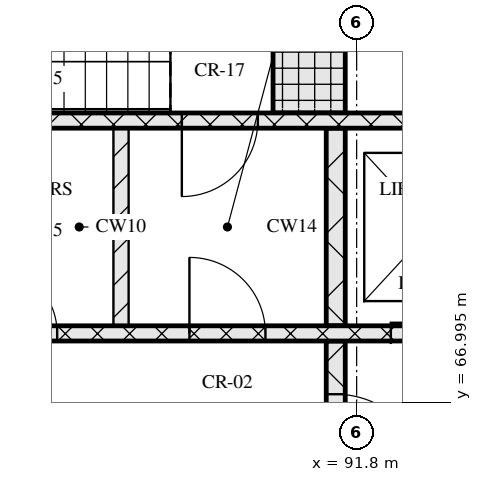
"""IFC4 building model, lengths in metres.
Left out: names, types, materials, properties, quantities, classifications, styles, units other than length and angle.
Written with IfcOpenShell. Run it as: python <this file> out.ifc"""

import sys

from ifc_helpers import new_model, si_unit, direction, frame, frame_2d, origin, place, context, subcontext, project, spatial, rectangle, extrude, element, fill, save


model = new_model("IFC4")
c1 = context("Model", 3, precision=1e-05, world=origin(), true_north=direction((0.0, 1.0)))
c2 = subcontext(c1, "Body", "Model", "MODEL_VIEW")
j1 = project(units=[si_unit("LENGTHUNIT", "METRE"), si_unit("PLANEANGLEUNIT", "RADIAN")], contexts=[c1])
p1 = place(None, origin())
s1 = spatial("IfcSite", under=j1, at=p1, CompositionType="ELEMENT")
p2 = place(p1, origin())
s2 = spatial("IfcBuilding", under=s1, at=p2, CompositionType="ELEMENT")
p3 = place(p2, frame((0.0, 0.0, 234.3)))
s3 = spatial("IfcBuildingStorey", under=s2, at=p3, CompositionType="ELEMENT", Elevation=234.3)
p4 = place(p3, frame((91.525, 65.2, 0.0), z_axis=(0.0, 0.0, 1.0), x_axis=(0.0, 1.0, 0.0)))
e1 = element("IfcWall", 1, at=p4, inside=s3, PredefinedType="SOLIDWALL", context=c2, shape_type="SweptSolid", body=[
    extrude(rectangle(XDim=2.6, YDim=0.25, at=frame_2d((1.3, 0.0))), origin(), (0.0, 0.0, 1.0), 3.32),
])
p5 = place(p4, frame((0.7, 0.0, 0.0)))
e2 = element("IfcOpeningElement", 2, at=p5, cuts=e1, PredefinedType="OPENING", context=c2, shape_type="SweptSolid", body=[
    extrude(rectangle(XDim=1.2, YDim=2.1, at=frame_2d((0.6, 1.05))), frame((0.0, 0.135, 0.0), z_axis=(0.0, -1.0, 0.0), x_axis=(1.0, 0.0, 0.0)), (0.0, 0.0, 1.0), 0.27),
])
p6 = place(p3, frame((76.05, 67.9, 0.0), z_axis=(0.0, 0.0, 1.0), x_axis=(1.0, 0.0, 0.0)))
e3 = element("IfcWall", 3, at=p6, inside=s3, PredefinedType="SOLIDWALL", context=c2, shape_type="SweptSolid", body=[
    extrude(rectangle(XDim=23.1, YDim=0.2, at=frame_2d((11.55, 0.0))), origin(), (0.0, 0.0, 1.0), 3.32),
])
p7 = place(p6, frame((1.35, 0.0, 0.0)))
e4 = element("IfcOpeningElement", 4, at=p7, cuts=e3, PredefinedType="OPENING", context=c2, shape_type="SweptSolid", body=[
    extrude(rectangle(XDim=0.9, YDim=2.1, at=frame_2d((0.45, 1.05))), frame((0.0, 0.11, 0.0), z_axis=(0.0, -1.0, 0.0), x_axis=(1.0, 0.0, 0.0)), (0.0, 0.0, 1.0), 0.22),
])
p8 = place(p6, frame((5.06, 0.0, 0.0)))
e5 = element("IfcOpeningElement", 5, at=p8, cuts=e3, PredefinedType="OPENING", context=c2, shape_type="SweptSolid", body=[
    extrude(rectangle(XDim=0.9, YDim=2.1, at=frame_2d((0.45, 1.05))), frame((0.0, 0.11, 0.0), z_axis=(0.0, -1.0, 0.0), x_axis=(1.0, 0.0, 0.0)), (0.0, 0.0, 1.0), 0.22),
])
p9 = place(p6, frame((8.45, 0.0, 0.0)))
e6 = element("IfcOpeningElement", 6, at=p9, cuts=e3, PredefinedType="OPENING", context=c2, shape_type="SweptSolid", body=[
    extrude(rectangle(XDim=0.9, YDim=2.1, at=frame_2d((0.45, 1.05))), frame((0.0, 0.11, 0.0), z_axis=(0.0, -1.0, 0.0), x_axis=(1.0, 0.0, 0.0)), (0.0, 0.0, 1.0), 0.22),
])
p10 = place(p6, frame((10.91, 0.0, 0.0)))
e7 = element("IfcOpeningElement", 7, at=p10, cuts=e3, PredefinedType="OPENING", context=c2, shape_type="SweptSolid", body=[
    extrude(rectangle(XDim=0.9, YDim=2.1, at=frame_2d((0.45, 1.05))), frame((0.0, 0.11, 0.0), z_axis=(0.0, -1.0, 0.0), x_axis=(1.0, 0.0, 0.0)), (0.0, 0.0, 1.0), 0.22),
])
p11 = place(p6, frame((13.55, 0.0, 0.0)))
e8 = element("IfcOpeningElement", 8, at=p11, cuts=e3, PredefinedType="OPENING", context=c2, shape_type="SweptSolid", body=[
    extrude(rectangle(XDim=1.0, YDim=2.1, at=frame_2d((0.5, 1.05))), frame((0.0, 0.11, 0.0), z_axis=(0.0, -1.0, 0.0), x_axis=(1.0, 0.0, 0.0)), (0.0, 0.0, 1.0), 0.22),
])
p12 = place(p6, frame((16.2, 0.0, 0.0)))
e9 = element("IfcOpeningElement", 9, at=p12, cuts=e3, PredefinedType="OPENING", context=c2, shape_type="SweptSolid", body=[
    extrude(rectangle(XDim=1.1, YDim=2.1, at=frame_2d((0.55, 1.05))), frame((0.0, 0.11, 0.0), z_axis=(0.0, -1.0, 0.0), x_axis=(1.0, 0.0, 0.0)), (0.0, 0.0, 1.0), 0.22),
])
p13 = place(p6, frame((18.7, 0.0, 0.0)))
e10 = element("IfcOpeningElement", 10, at=p13, cuts=e3, PredefinedType="OPENING", context=c2, shape_type="SweptSolid", body=[
    extrude(rectangle(XDim=1.1, YDim=2.1, at=frame_2d((0.55, 1.05))), frame((0.0, 0.11, 0.0), z_axis=(0.0, -1.0, 0.0), x_axis=(1.0, 0.0, 0.0)), (0.0, 0.0, 1.0), 0.22),
])
p14 = place(p6, frame((21.2, 0.0, 0.0)))
e11 = element("IfcOpeningElement", 11, at=p14, cuts=e3, PredefinedType="OPENING", context=c2, shape_type="SweptSolid", body=[
    extrude(rectangle(XDim=1.1, YDim=2.1, at=frame_2d((0.55, 1.05))), frame((0.0, 0.11, 0.0), z_axis=(0.0, -1.0, 0.0), x_axis=(1.0, 0.0, 0.0)), (0.0, 0.0, 1.0), 0.22),
])
p15 = place(p3, frame((88.7, 68.0, 0.0), z_axis=(0.0, 0.0, 1.0), x_axis=(0.0, 1.0, 0.0)))
e12 = element("IfcWall", 12, at=p15, inside=s3, PredefinedType="PARTITIONING", context=c2, shape_type="SweptSolid", body=[
    extrude(rectangle(XDim=2.6, YDim=0.2, at=frame_2d((1.3, 0.0))), origin(), (0.0, 0.0, 1.0), 3.32),
])
p16 = place(p3, frame((91.525, 68.0, 0.0), z_axis=(0.0, 0.0, 1.0), x_axis=(0.0, 1.0, 0.0)))
e13 = element("IfcWall", 13, at=p16, inside=s3, PredefinedType="SOLIDWALL", context=c2, shape_type="SweptSolid", body=[
    extrude(rectangle(XDim=2.6, YDim=0.25, at=frame_2d((1.3, 0.0))), origin(), (0.0, 0.0, 1.0), 3.32),
])
p17 = place(p3, frame((67.8, 70.7, 0.0), z_axis=(0.0, 0.0, 1.0), x_axis=(1.0, 0.0, 0.0)))
e14 = element("IfcWall", 14, at=p17, inside=s3, PredefinedType="SOLIDWALL", context=c2, shape_type="SweptSolid", body=[
    extrude(rectangle(XDim=39.6, YDim=0.2, at=frame_2d((19.8, 0.0))), origin(), (0.0, 0.0, 1.0), 3.32),
])
p18 = place(p17, frame((0.65, 0.0, 0.0)))
e15 = element("IfcOpeningElement", 15, at=p18, cuts=e14, PredefinedType="OPENING", context=c2, shape_type="SweptSolid", body=[
    extrude(rectangle(XDim=1.1, YDim=2.1, at=frame_2d((0.55, 1.05))), frame((0.0, 0.11, 0.0), z_axis=(0.0, -1.0, 0.0), x_axis=(1.0, 0.0, 0.0)), (0.0, 0.0, 1.0), 0.22),
])
p19 = place(p17, frame((3.25, 0.0, 0.0)))
e16 = element("IfcOpeningElement", 16, at=p19, cuts=e14, PredefinedType="OPENING", context=c2, shape_type="SweptSolid", body=[
    extrude(rectangle(XDim=1.1, YDim=2.1, at=frame_2d((0.55, 1.05))), frame((0.0, 0.11, 0.0), z_axis=(0.0, -1.0, 0.0), x_axis=(1.0, 0.0, 0.0)), (0.0, 0.0, 1.0), 0.22),
])
p20 = place(p17, frame((5.9, 0.0, 0.0)))
e17 = element("IfcOpeningElement", 17, at=p20, cuts=e14, PredefinedType="OPENING", context=c2, shape_type="SweptSolid", body=[
    extrude(rectangle(XDim=1.0, YDim=2.1, at=frame_2d((0.5, 1.05))), frame((0.0, 0.11, 0.0), z_axis=(0.0, -1.0, 0.0), x_axis=(1.0, 0.0, 0.0)), (0.0, 0.0, 1.0), 0.22),
])
p21 = place(p17, frame((21.7, 0.0, 0.0)))
e18 = element("IfcOpeningElement", 18, at=p21, cuts=e14, PredefinedType="OPENING", context=c2, shape_type="SweptSolid", body=[
    extrude(rectangle(XDim=1.0, YDim=2.1, at=frame_2d((0.5, 1.05))), frame((0.0, 0.11, 0.0), z_axis=(0.0, -1.0, 0.0), x_axis=(1.0, 0.0, 0.0)), (0.0, 0.0, 1.0), 0.22),
])
p22 = place(p17, frame((32.7, 0.0, 0.0)))
e19 = element("IfcOpeningElement", 19, at=p22, cuts=e14, PredefinedType="OPENING", context=c2, shape_type="SweptSolid", body=[
    extrude(rectangle(XDim=1.0, YDim=2.1, at=frame_2d((0.5, 1.05))), frame((0.0, 0.11, 0.0), z_axis=(0.0, -1.0, 0.0), x_axis=(1.0, 0.0, 0.0)), (0.0, 0.0, 1.0), 0.22),
])
p23 = place(p17, frame((35.25, 0.0, 0.0)))
e20 = element("IfcOpeningElement", 20, at=p23, cuts=e14, PredefinedType="OPENING", context=c2, shape_type="SweptSolid", body=[
    extrude(rectangle(XDim=1.1, YDim=2.1, at=frame_2d((0.55, 1.05))), frame((0.0, 0.11, 0.0), z_axis=(0.0, -1.0, 0.0), x_axis=(1.0, 0.0, 0.0)), (0.0, 0.0, 1.0), 0.22),
])
p24 = place(p17, frame((37.85, 0.0, 0.0)))
e21 = element("IfcOpeningElement", 21, at=p24, cuts=e14, PredefinedType="OPENING", context=c2, shape_type="SweptSolid", body=[
    extrude(rectangle(XDim=1.1, YDim=2.1, at=frame_2d((0.55, 1.05))), frame((0.0, 0.11, 0.0), z_axis=(0.0, -1.0, 0.0), x_axis=(1.0, 0.0, 0.0)), (0.0, 0.0, 1.0), 0.22),
])
p25 = place(p3, frame((91.175, 70.8, 0.0), z_axis=(0.0, 0.0, 1.0), x_axis=(0.0, 1.0, 0.0)))
e22 = element("IfcWall", 22, at=p25, inside=s3, PredefinedType="SOLIDWALL", context=c2, shape_type="SweptSolid", body=[
    extrude(rectangle(XDim=2.95, YDim=0.95, at=frame_2d((1.475, 0.0))), origin(), (0.0, 0.0, 1.0), 3.32),
])
p26 = place(p5, origin())
e23 = element("IfcDoor", 23, at=p26, inside=s3, OperationType="SINGLE_SWING_RIGHT", PredefinedType="DOOR", context=c2, shape_type="SweptSolid", body=[
    extrude(rectangle(XDim=1.2, YDim=2.1, at=frame_2d((0.6, 1.05))), frame((0.0, 0.025, 0.0), z_axis=(0.0, -1.0, 0.0), x_axis=(1.0, 0.0, 0.0)), (0.0, 0.0, 1.0), 0.05),
])
fill(e2, e23)
p27 = place(p10, origin())
e24 = element("IfcDoor", 24, at=p27, inside=s3, OperationType="SINGLE_SWING_LEFT", PredefinedType="DOOR", context=c2, shape_type="SweptSolid", body=[
    extrude(rectangle(XDim=0.9, YDim=2.1, at=frame_2d((0.45, 1.05))), frame((0.0, 0.025, 0.0), z_axis=(0.0, -1.0, 0.0), x_axis=(1.0, 0.0, 0.0)), (0.0, 0.0, 1.0), 0.05),
])
fill(e7, e24)
p28 = place(p11, origin())
e25 = element("IfcDoor", 25, at=p28, inside=s3, OperationType="SINGLE_SWING_LEFT", PredefinedType="DOOR", context=c2, shape_type="SweptSolid", body=[
    extrude(rectangle(XDim=1.0, YDim=2.1, at=frame_2d((0.5, 1.05))), frame((0.0, 0.025, 0.0), z_axis=(0.0, -1.0, 0.0), x_axis=(1.0, 0.0, 0.0)), (0.0, 0.0, 1.0), 0.05),
])
fill(e8, e25)
p29 = place(p12, origin())
e26 = element("IfcDoor", 26, at=p29, inside=s3, OperationType="SLIDING_TO_RIGHT", PredefinedType="DOOR", context=c2, shape_type="SweptSolid", body=[
    extrude(rectangle(XDim=1.1, YDim=2.1, at=frame_2d((0.55, 1.05))), frame((0.0, 0.025, 0.0), z_axis=(0.0, -1.0, 0.0), x_axis=(1.0, 0.0, 0.0)), (0.0, 0.0, 1.0), 0.05),
])
fill(e9, e26)
p30 = place(p21, origin())
e27 = element("IfcDoor", 27, at=p30, inside=s3, OperationType="SINGLE_SWING_RIGHT", PredefinedType="DOOR", context=c2, shape_type="SweptSolid", body=[
    extrude(rectangle(XDim=1.0, YDim=2.1, at=frame_2d((0.5, 1.05))), frame((0.0, 0.025, 0.0), z_axis=(0.0, -1.0, 0.0), x_axis=(1.0, 0.0, 0.0)), (0.0, 0.0, 1.0), 0.05),
])
fill(e18, e27)
save(model, sys.argv[1])
